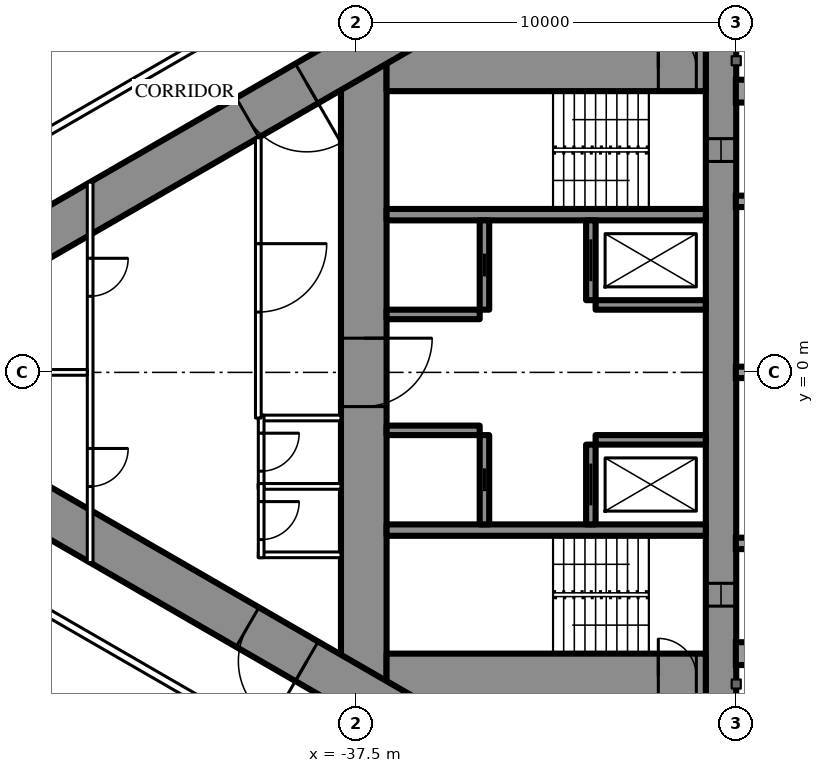
"""IFC4 building model, lengths in metres.
Left out: names, types, materials, properties, quantities, classifications, styles, units other than length and angle.
Written with IfcOpenShell. Run it as: python <this file> out.ifc"""

import sys

from ifc_helpers import new_model, si_unit, direction, frame, frame_2d, origin, place, context, subcontext, project, spatial, rectangle, extrude, element, fill, save


model = new_model("IFC4")
c1 = context("Model", 3, precision=1e-05, world=origin(), true_north=direction((0.0, 1.0)))
c2 = subcontext(c1, "Body", "Model", "MODEL_VIEW")
j1 = project(units=[si_unit("LENGTHUNIT", "METRE"), si_unit("PLANEANGLEUNIT", "RADIAN")], contexts=[c1])
p1 = place(None, origin())
s1 = spatial("IfcSite", under=j1, at=p1, CompositionType="ELEMENT")
p2 = place(p1, origin())
s2 = spatial("IfcBuilding", under=s1, at=p2, CompositionType="ELEMENT")
p3 = place(p2, frame((0.0, 0.0, 49.5)))
s3 = spatial("IfcBuildingStorey", under=s2, at=p3, CompositionType="ELEMENT", Elevation=49.5)
p4 = place(p3, frame((-27.9, 8.6, 0.0), z_axis=(0.0, 0.0, 1.0), x_axis=(0.0, -1.0, 0.0)))
e1 = element("IfcWall", 1, at=p4, inside=s3, PredefinedType="SHEAR", context=c2, shape_type="SweptSolid", body=[
    extrude(rectangle(XDim=17.2, YDim=0.8, at=frame_2d((8.6, 0.0))), origin(), (0.0, 0.0, 1.0), 3.5),
])
p5 = place(p4, frame((2.45, 0.0, 0.6)))
e2 = element("IfcOpeningElement", 2, at=p5, cuts=e1, PredefinedType="OPENING", context=c2, shape_type="SweptSolid", body=[
    extrude(rectangle(XDim=0.6, YDim=2.1, at=frame_2d((0.3, 1.05))), frame((0.0, 0.41, 0.0), z_axis=(0.0, -1.0, 0.0), x_axis=(1.0, 0.0, 0.0)), (0.0, 0.0, 1.0), 0.82),
])
p6 = place(p4, frame((14.15, 0.0, 0.6)))
e3 = element("IfcOpeningElement", 3, at=p6, cuts=e1, PredefinedType="OPENING", context=c2, shape_type="SweptSolid", body=[
    extrude(rectangle(XDim=0.6, YDim=2.1, at=frame_2d((0.3, 1.05))), frame((0.0, 0.41, 0.0), z_axis=(0.0, -1.0, 0.0), x_axis=(1.0, 0.0, 0.0)), (0.0, 0.0, 1.0), 0.82),
])
p7 = place(p3, frame((-37.3, 8.6, 0.0), z_axis=(0.0, 0.0, 1.0), x_axis=(0.0, -1.0, 0.0)))
e4 = element("IfcWall", 4, at=p7, inside=s3, PredefinedType="SHEAR", context=c2, shape_type="SweptSolid", body=[
    extrude(rectangle(XDim=17.2, YDim=1.2, at=frame_2d((8.6, 0.0))), origin(), (0.0, 0.0, 1.0), 3.5),
])
p8 = place(p7, frame((7.7, 0.0, 0.0)))
e5 = element("IfcOpeningElement", 5, at=p8, cuts=e4, PredefinedType="OPENING", context=c2, shape_type="SweptSolid", body=[
    extrude(rectangle(XDim=1.8, YDim=2.2, at=frame_2d((0.9, 1.1))), frame((0.0, 0.61, 0.0), z_axis=(0.0, -1.0, 0.0), x_axis=(1.0, 0.0, 0.0)), (0.0, 0.0, 1.0), 1.22),
])
p9 = place(p3, frame((-28.3, 8.0, 0.0), z_axis=(0.0, 0.0, 1.0), x_axis=(-1.0, 0.0, 0.0)))
e6 = element("IfcWall", 6, at=p9, inside=s3, PredefinedType="SHEAR", context=c2, shape_type="SweptSolid", body=[
    extrude(rectangle(XDim=8.4, YDim=1.2, at=frame_2d((4.2, 0.0))), origin(), (0.0, 0.0, 1.0), 3.5),
])
p10 = place(p9, frame((0.25, 0.0, 0.0)))
e7 = element("IfcOpeningElement", 7, at=p10, cuts=e6, PredefinedType="OPENING", context=c2, shape_type="SweptSolid", body=[
    extrude(rectangle(XDim=1.0, YDim=2.2, at=frame_2d((0.5, 1.1))), frame((0.0, 0.61, 0.0), z_axis=(0.0, -1.0, 0.0), x_axis=(1.0, 0.0, 0.0)), (0.0, 0.0, 1.0), 1.22),
])
p11 = place(p3, frame((-28.3, -8.0, 0.0), z_axis=(0.0, 0.0, 1.0), x_axis=(-1.0, 0.0, 0.0)))
e8 = element("IfcWall", 8, at=p11, inside=s3, PredefinedType="SHEAR", context=c2, shape_type="SweptSolid", body=[
    extrude(rectangle(XDim=8.4, YDim=1.2, at=frame_2d((4.2, 0.0))), origin(), (0.0, 0.0, 1.0), 3.5),
])
p12 = place(p11, frame((0.25, 0.0, 0.0)))
e9 = element("IfcOpeningElement", 9, at=p12, cuts=e8, PredefinedType="OPENING", context=c2, shape_type="SweptSolid", body=[
    extrude(rectangle(XDim=1.0, YDim=2.2, at=frame_2d((0.5, 1.1))), frame((0.0, 0.61, 0.0), z_axis=(0.0, -1.0, 0.0), x_axis=(1.0, 0.0, 0.0)), (0.0, 0.0, 1.0), 1.22),
])
for number, where, z_axis, x_axis in (
    (10, (-28.3, 4.15, 0.0), (0.0, 0.0, 1.0), (-1.0, 0.0, 0.0)),
    (11, (-28.3, -4.15, 0.0), (0.0, 0.0, 1.0), (-1.0, 0.0, 0.0)),
):
    element("IfcWall", number, at=place(p3, frame(where, z_axis=z_axis, x_axis=x_axis)), inside=s3, PredefinedType="SHEAR", context=c2, shape_type="SweptSolid", body=[
        extrude(rectangle(XDim=8.4, YDim=0.3, at=frame_2d((4.2, 0.0))), origin(), (0.0, 0.0, 1.0), 3.5),
    ])
p13 = place(p3, frame((-31.325, 4.0, 0.0), z_axis=(0.0, 0.0, 1.0), x_axis=(0.0, -1.0, 0.0)))
e12 = element("IfcWall", 12, at=p13, inside=s3, PredefinedType="SHEAR", context=c2, shape_type="SweptSolid", body=[
    extrude(rectangle(XDim=2.1, YDim=0.25, at=frame_2d((1.05, 0.0))), origin(), (0.0, 0.0, 1.0), 3.5),
])
p14 = place(p13, frame((0.5, 0.0, 0.0)))
e13 = element("IfcOpeningElement", 13, at=p14, cuts=e12, PredefinedType="OPENING", context=c2, shape_type="SweptSolid", body=[
    extrude(rectangle(XDim=1.1, YDim=2.2, at=frame_2d((0.55, 1.1))), frame((0.0, 0.135, 0.0), z_axis=(0.0, -1.0, 0.0), x_axis=(1.0, 0.0, 0.0)), (0.0, 0.0, 1.0), 0.27),
])
p15 = place(p3, frame((-34.125, 4.0, 0.0), z_axis=(0.0, 0.0, 1.0), x_axis=(0.0, -1.0, 0.0)))
e14 = element("IfcWall", 14, at=p15, inside=s3, PredefinedType="SHEAR", context=c2, shape_type="SweptSolid", body=[
    extrude(rectangle(XDim=2.35, YDim=0.25, at=frame_2d((1.175, 0.0))), origin(), (0.0, 0.0, 1.0), 3.5),
])
p16 = place(p15, frame((0.875, 0.0, 0.0)))
e15 = element("IfcOpeningElement", 15, at=p16, cuts=e14, PredefinedType="OPENING", context=c2, shape_type="SweptSolid", body=[
    extrude(rectangle(XDim=0.6, YDim=2.0, at=frame_2d((0.3, 1.0))), frame((0.0, 0.135, 0.0), z_axis=(0.0, -1.0, 0.0), x_axis=(1.0, 0.0, 0.0)), (0.0, 0.0, 1.0), 0.27),
])
p17 = place(p3, frame((-28.3, 1.775, 0.0), z_axis=(0.0, 0.0, 1.0), x_axis=(-1.0, 0.0, 0.0)))
e16 = element("IfcWall", 16, at=p17, inside=s3, PredefinedType="SHEAR", context=c2, shape_type="SweptSolid", body=[
    extrude(rectangle(XDim=2.9, YDim=0.25, at=frame_2d((1.45, 0.0))), origin(), (0.0, 0.0, 1.0), 3.5),
])
p18 = place(p3, frame((-34.25, 1.525, 0.0), z_axis=(0.0, 0.0, 1.0), x_axis=(-1.0, 0.0, 0.0)))
e17 = element("IfcWall", 17, at=p18, inside=s3, PredefinedType="SHEAR", context=c2, shape_type="SweptSolid", body=[
    extrude(rectangle(XDim=2.45, YDim=0.25, at=frame_2d((1.225, 0.0))), origin(), (0.0, 0.0, 1.0), 3.5),
])
p19 = place(p3, frame((-31.325, -1.9, 0.0), z_axis=(0.0, 0.0, 1.0), x_axis=(0.0, -1.0, 0.0)))
e18 = element("IfcWall", 18, at=p19, inside=s3, PredefinedType="SHEAR", context=c2, shape_type="SweptSolid", body=[
    extrude(rectangle(XDim=2.1, YDim=0.25, at=frame_2d((1.05, 0.0))), origin(), (0.0, 0.0, 1.0), 3.5),
])
p20 = place(p19, frame((0.5, 0.0, 0.0)))
e19 = element("IfcOpeningElement", 19, at=p20, cuts=e18, PredefinedType="OPENING", context=c2, shape_type="SweptSolid", body=[
    extrude(rectangle(XDim=1.1, YDim=2.2, at=frame_2d((0.55, 1.1))), frame((0.0, 0.135, 0.0), z_axis=(0.0, -1.0, 0.0), x_axis=(1.0, 0.0, 0.0)), (0.0, 0.0, 1.0), 0.27),
])
p21 = place(p3, frame((-34.125, -1.65, 0.0), z_axis=(0.0, 0.0, 1.0), x_axis=(0.0, -1.0, 0.0)))
e20 = element("IfcWall", 20, at=p21, inside=s3, PredefinedType="SHEAR", context=c2, shape_type="SweptSolid", body=[
    extrude(rectangle(XDim=2.35, YDim=0.25, at=frame_2d((1.175, 0.0))), origin(), (0.0, 0.0, 1.0), 3.5),
])
p22 = place(p21, frame((0.875, 0.0, 0.0)))
e21 = element("IfcOpeningElement", 21, at=p22, cuts=e20, PredefinedType="OPENING", context=c2, shape_type="SweptSolid", body=[
    extrude(rectangle(XDim=0.6, YDim=2.0, at=frame_2d((0.3, 1.0))), frame((0.0, 0.135, 0.0), z_axis=(0.0, -1.0, 0.0), x_axis=(1.0, 0.0, 0.0)), (0.0, 0.0, 1.0), 0.27),
])
p23 = place(p3, frame((-28.3, -1.775, 0.0), z_axis=(0.0, 0.0, 1.0), x_axis=(-1.0, 0.0, 0.0)))
e22 = element("IfcWall", 22, at=p23, inside=s3, PredefinedType="SHEAR", context=c2, shape_type="SweptSolid", body=[
    extrude(rectangle(XDim=2.9, YDim=0.25, at=frame_2d((1.45, 0.0))), origin(), (0.0, 0.0, 1.0), 3.5),
])
p24 = place(p3, frame((-34.25, -1.525, 0.0), z_axis=(0.0, 0.0, 1.0), x_axis=(-1.0, 0.0, 0.0)))
e23 = element("IfcWall", 23, at=p24, inside=s3, PredefinedType="SHEAR", context=c2, shape_type="SweptSolid", body=[
    extrude(rectangle(XDim=2.45, YDim=0.25, at=frame_2d((1.225, 0.0))), origin(), (0.0, 0.0, 1.0), 3.5),
])
p25 = place(p3, frame((-27.2, 14.3, 0.0), z_axis=(0.0, 0.0, 1.0), x_axis=(-0.866026593062, -0.499997940104, 0.0)))
e24 = element("IfcWall", 24, at=p25, inside=s3, PredefinedType="SHEAR", context=c2, shape_type="SweptSolid", body=[
    extrude(rectangle(XDim=28.946, YDim=1.2, at=frame_2d((14.473, 0.0))), origin(), (0.0, 0.0, 1.0), 3.5),
])
p26 = place(p25, frame((4.6, 0.0, 0.0)))
e25 = element("IfcOpeningElement", 25, at=p26, cuts=e24, PredefinedType="OPENING", context=c2, shape_type="SweptSolid", body=[
    extrude(rectangle(XDim=1.0, YDim=2.2, at=frame_2d((0.5, 1.1))), frame((0.0, 0.61, 0.0), z_axis=(0.0, -1.0, 0.0), x_axis=(1.0, 0.0, 0.0)), (0.0, 0.0, 1.0), 1.22),
])
p27 = place(p25, frame((13.395, 0.0, 0.0)))
e26 = element("IfcOpeningElement", 26, at=p27, cuts=e24, PredefinedType="OPENING", context=c2, shape_type="SweptSolid", body=[
    extrude(rectangle(XDim=1.8, YDim=2.2, at=frame_2d((0.9, 1.1))), frame((0.0, 0.61, 0.0), z_axis=(0.0, -1.0, 0.0), x_axis=(1.0, 0.0, 0.0)), (0.0, 0.0, 1.0), 1.22),
])
p28 = place(p3, frame((-27.2, -14.3, 0.0), z_axis=(0.0, 0.0, 1.0), x_axis=(-0.866024021859, 0.500002393557, 0.0)))
e27 = element("IfcWall", 27, at=p28, inside=s3, PredefinedType="SHEAR", context=c2, shape_type="SweptSolid", body=[
    extrude(rectangle(XDim=27.907, YDim=1.2, at=frame_2d((13.954, 0.0))), origin(), (0.0, 0.0, 1.0), 3.5),
])
p29 = place(p28, frame((4.6, 0.0, 0.0)))
e28 = element("IfcOpeningElement", 28, at=p29, cuts=e27, PredefinedType="OPENING", context=c2, shape_type="SweptSolid", body=[
    extrude(rectangle(XDim=1.0, YDim=2.2, at=frame_2d((0.5, 1.1))), frame((0.0, 0.61, 0.0), z_axis=(0.0, -1.0, 0.0), x_axis=(1.0, 0.0, 0.0)), (0.0, 0.0, 1.0), 1.22),
])
p30 = place(p28, frame((13.395, 0.0, 0.0)))
e29 = element("IfcOpeningElement", 29, at=p30, cuts=e27, PredefinedType="OPENING", context=c2, shape_type="SweptSolid", body=[
    extrude(rectangle(XDim=1.8, YDim=2.2, at=frame_2d((0.9, 1.1))), frame((0.0, 0.61, 0.0), z_axis=(0.0, -1.0, 0.0), x_axis=(1.0, 0.0, 0.0)), (0.0, 0.0, 1.0), 1.22),
])
p31 = place(p3, frame((-37.7, 10.894, 0.0), z_axis=(0.0, 0.0, 1.0), x_axis=(-0.866027905338, -0.499995667157, 0.0)))
e30 = element("IfcWall", 30, at=p31, inside=s3, PredefinedType="PARTITIONING", context=c2, shape_type="SweptSolid", body=[
    extrude(rectangle(XDim=21.787, YDim=0.2, at=frame_2d((10.894, 0.0))), origin(), (0.0, 0.0, 1.0), 3.25),
])
p32 = place(p31, frame((20.237, 0.0, 0.0)))
e31 = element("IfcOpeningElement", 31, at=p32, cuts=e30, PredefinedType="OPENING", context=c2, shape_type="SweptSolid", body=[
    extrude(rectangle(XDim=0.95, YDim=2.2, at=frame_2d((0.475, 1.1))), frame((0.0, 0.11, 0.0), z_axis=(0.0, -1.0, 0.0), x_axis=(1.0, 0.0, 0.0)), (0.0, 0.0, 1.0), 0.22),
])
p33 = place(p31, frame((2.95, 0.0, 0.0)))
e32 = element("IfcOpeningElement", 32, at=p33, cuts=e30, PredefinedType="OPENING", context=c2, shape_type="SweptSolid", body=[
    extrude(rectangle(XDim=0.95, YDim=2.2, at=frame_2d((0.475, 1.1))), frame((0.0, 0.11, 0.0), z_axis=(0.0, -1.0, 0.0), x_axis=(1.0, 0.0, 0.0)), (0.0, 0.0, 1.0), 0.22),
])
p34 = place(p3, frame((-36.92, -11.344, 0.0), z_axis=(0.0, 0.0, 1.0), x_axis=(-0.866025017052, 0.500000669839, 0.0)))
e33 = element("IfcWall", 33, at=p34, inside=s3, PredefinedType="PARTITIONING", context=c2, shape_type="SweptSolid", body=[
    extrude(rectangle(XDim=12.28, YDim=0.2, at=frame_2d((6.14, 0.0))), origin(), (0.0, 0.0, 1.0), 3.25),
])
p35 = place(p34, frame((3.35, 0.0, 0.0)))
e34 = element("IfcOpeningElement", 34, at=p35, cuts=e33, PredefinedType="OPENING", context=c2, shape_type="SweptSolid", body=[
    extrude(rectangle(XDim=1.0, YDim=2.2, at=frame_2d((0.5, 1.1))), frame((0.0, 0.11, 0.0), z_axis=(0.0, -1.0, 0.0), x_axis=(1.0, 0.0, 0.0)), (0.0, 0.0, 1.0), 0.22),
])
for number, where, z_axis, x_axis in (
    (35, (-37.9, -1.2, 0.0), (0.0, 0.0, 1.0), (-1.0, 0.0, 0.0)),
    (36, (-37.9, -3.0, 0.0), (0.0, 0.0, 1.0), (-1.0, 0.0, 0.0)),
    (37, (-37.9, -4.8, 0.0), (0.0, 0.0, 1.0), (-1.0, 0.0, 0.0)),
):
    element("IfcWall", number, at=place(p3, frame(where, z_axis=z_axis, x_axis=x_axis)), inside=s3, PredefinedType="PARTITIONING", context=c2, shape_type="SweptSolid", body=[
        extrude(rectangle(XDim=2.175, YDim=0.15, at=frame_2d((1.087, 0.0))), origin(), (0.0, 0.0, 1.0), 3.25),
    ])
p36 = place(p3, frame((-40.0, -1.125, 0.0), z_axis=(0.0, 0.0, 1.0), x_axis=(0.0, -1.0, 0.0)))
e38 = element("IfcWall", 38, at=p36, inside=s3, PredefinedType="PARTITIONING", context=c2, shape_type="SweptSolid", body=[
    extrude(rectangle(XDim=1.95, YDim=0.15, at=frame_2d((0.975, 0.0))), origin(), (0.0, 0.0, 1.0), 3.25),
])
p37 = place(p36, frame((0.475, 0.0, 0.0)))
e39 = element("IfcOpeningElement", 39, at=p37, cuts=e38, PredefinedType="OPENING", context=c2, shape_type="SweptSolid", body=[
    extrude(rectangle(XDim=1.0, YDim=2.2, at=frame_2d((0.5, 1.1))), frame((0.0, 0.085, 0.0), z_axis=(0.0, -1.0, 0.0), x_axis=(1.0, 0.0, 0.0)), (0.0, 0.0, 1.0), 0.17),
])
p38 = place(p3, frame((-40.0, -2.925, 0.0), z_axis=(0.0, 0.0, 1.0), x_axis=(0.0, -1.0, 0.0)))
e40 = element("IfcWall", 40, at=p38, inside=s3, PredefinedType="PARTITIONING", context=c2, shape_type="SweptSolid", body=[
    extrude(rectangle(XDim=1.95, YDim=0.15, at=frame_2d((0.975, 0.0))), origin(), (0.0, 0.0, 1.0), 3.25),
])
p39 = place(p38, frame((0.475, 0.0, 0.0)))
e41 = element("IfcOpeningElement", 41, at=p39, cuts=e40, PredefinedType="OPENING", context=c2, shape_type="SweptSolid", body=[
    extrude(rectangle(XDim=1.0, YDim=2.2, at=frame_2d((0.5, 1.1))), frame((0.0, 0.085, 0.0), z_axis=(0.0, -1.0, 0.0), x_axis=(1.0, 0.0, 0.0)), (0.0, 0.0, 1.0), 0.17),
])
p40 = place(p3, frame((-40.075, 6.174, 0.0), z_axis=(0.0, 0.0, 1.0), x_axis=(0.0, -1.0, 0.0)))
e42 = element("IfcWall", 42, at=p40, inside=s3, PredefinedType="PARTITIONING", context=c2, shape_type="SweptSolid", body=[
    extrude(rectangle(XDim=7.374, YDim=0.15, at=frame_2d((3.687, 0.0))), origin(), (0.0, 0.0, 1.0), 3.25),
])
p41 = place(p40, frame((2.787, 0.0, 0.0)))
e43 = element("IfcOpeningElement", 43, at=p41, cuts=e42, PredefinedType="OPENING", context=c2, shape_type="SweptSolid", body=[
    extrude(rectangle(XDim=1.8, YDim=2.2, at=frame_2d((0.9, 1.1))), frame((0.0, 0.085, 0.0), z_axis=(0.0, -1.0, 0.0), x_axis=(1.0, 0.0, 0.0)), (0.0, 0.0, 1.0), 0.17),
])
p42 = place(p3, frame((-44.5, 5.005, 0.0), z_axis=(0.0, 0.0, 1.0), x_axis=(0.0, -1.0, 0.0)))
e44 = element("IfcWall", 44, at=p42, inside=s3, PredefinedType="PARTITIONING", context=c2, shape_type="SweptSolid", body=[
    extrude(rectangle(XDim=10.009, YDim=0.15, at=frame_2d((5.005, 0.0))), origin(), (0.0, 0.0, 1.0), 2.45),
])
p43 = place(p42, frame((2.002, 0.0, 0.0)))
e45 = element("IfcOpeningElement", 45, at=p43, cuts=e44, PredefinedType="OPENING", context=c2, shape_type="SweptSolid", body=[
    extrude(rectangle(XDim=1.0, YDim=2.2, at=frame_2d((0.5, 1.1))), frame((0.0, 0.085, 0.0), z_axis=(0.0, -1.0, 0.0), x_axis=(1.0, 0.0, 0.0)), (0.0, 0.0, 1.0), 0.17),
])
p44 = place(p42, frame((7.007, 0.0, 0.0)))
e46 = element("IfcOpeningElement", 46, at=p44, cuts=e44, PredefinedType="OPENING", context=c2, shape_type="SweptSolid", body=[
    extrude(rectangle(XDim=1.0, YDim=2.2, at=frame_2d((0.5, 1.1))), frame((0.0, 0.085, 0.0), z_axis=(0.0, -1.0, 0.0), x_axis=(1.0, 0.0, 0.0)), (0.0, 0.0, 1.0), 0.17),
])
p45 = place(p3, frame((-44.575, 0.0, 0.0), z_axis=(0.0, 0.0, 1.0), x_axis=(-1.0, 0.0, 0.0)))
e47 = element("IfcWall", 47, at=p45, inside=s3, PredefinedType="PARTITIONING", context=c2, shape_type="SweptSolid", body=[
    extrude(rectangle(XDim=8.593, YDim=0.15, at=frame_2d((4.297, 0.0))), origin(), (0.0, 0.0, 1.0), 2.25),
])
p46 = place(p37, origin())
e48 = element("IfcDoor", 48, at=p46, inside=s3, OperationType="SINGLE_SWING_LEFT", PredefinedType="DOOR", context=c2, shape_type="SweptSolid", body=[
    extrude(rectangle(XDim=1.0, YDim=2.2, at=frame_2d((0.5, 1.1))), frame((0.0, 0.025, 0.0), z_axis=(0.0, -1.0, 0.0), x_axis=(1.0, 0.0, 0.0)), (0.0, 0.0, 1.0), 0.05),
])
fill(e39, e48)
p47 = place(p39, origin())
e49 = element("IfcDoor", 49, at=p47, inside=s3, OperationType="SINGLE_SWING_LEFT", PredefinedType="DOOR", context=c2, shape_type="SweptSolid", body=[
    extrude(rectangle(XDim=1.0, YDim=2.2, at=frame_2d((0.5, 1.1))), frame((0.0, 0.025, 0.0), z_axis=(0.0, -1.0, 0.0), x_axis=(1.0, 0.0, 0.0)), (0.0, 0.0, 1.0), 0.05),
])
fill(e41, e49)
p48 = place(p41, origin())
e50 = element("IfcDoor", 50, at=p48, inside=s3, OperationType="DOUBLE_DOOR_SINGLE_SWING", PredefinedType="DOOR", context=c2, shape_type="SweptSolid", body=[
    extrude(rectangle(XDim=1.8, YDim=2.2, at=frame_2d((0.9, 1.1))), frame((0.0, 0.025, 0.0), z_axis=(0.0, -1.0, 0.0), x_axis=(1.0, 0.0, 0.0)), (0.0, 0.0, 1.0), 0.05),
])
fill(e43, e50)
p49 = place(p43, origin())
e51 = element("IfcDoor", 51, at=p49, inside=s3, OperationType="SINGLE_SWING_LEFT", PredefinedType="DOOR", context=c2, shape_type="SweptSolid", body=[
    extrude(rectangle(XDim=1.0, YDim=2.2, at=frame_2d((0.5, 1.1))), frame((0.0, 0.025, 0.0), z_axis=(0.0, -1.0, 0.0), x_axis=(1.0, 0.0, 0.0)), (0.0, 0.0, 1.0), 0.05),
])
fill(e45, e51)
p50 = place(p44, origin())
e52 = element("IfcDoor", 52, at=p50, inside=s3, OperationType="SINGLE_SWING_LEFT", PredefinedType="DOOR", context=c2, shape_type="SweptSolid", body=[
    extrude(rectangle(XDim=1.0, YDim=2.2, at=frame_2d((0.5, 1.1))), frame((0.0, 0.025, 0.0), z_axis=(0.0, -1.0, 0.0), x_axis=(1.0, 0.0, 0.0)), (0.0, 0.0, 1.0), 0.05),
])
fill(e46, e52)
p51 = place(p27, origin())
e53 = element("IfcDoor", 53, at=p51, inside=s3, OperationType="DOUBLE_DOOR_SINGLE_SWING", PredefinedType="DOOR", context=c2, shape_type="SweptSolid", body=[
    extrude(rectangle(XDim=1.8, YDim=2.2, at=frame_2d((0.9, 1.1))), frame((0.0, 0.025, 0.0), z_axis=(0.0, -1.0, 0.0), x_axis=(1.0, 0.0, 0.0)), (0.0, 0.0, 1.0), 0.05),
])
fill(e26, e53)
p52 = place(p30, origin())
e54 = element("IfcDoor", 54, at=p52, inside=s3, OperationType="DOUBLE_DOOR_SINGLE_SWING", PredefinedType="DOOR", context=c2, shape_type="SweptSolid", body=[
    extrude(rectangle(XDim=1.8, YDim=2.2, at=frame_2d((0.9, 1.1))), frame((0.0, 0.025, 0.0), z_axis=(0.0, -1.0, 0.0), x_axis=(1.0, 0.0, 0.0)), (0.0, 0.0, 1.0), 0.05),
])
fill(e29, e54)
p53 = place(p8, origin())
e55 = element("IfcDoor", 55, at=p53, inside=s3, OperationType="DOUBLE_DOOR_SINGLE_SWING", PredefinedType="DOOR", context=c2, shape_type="SweptSolid", body=[
    extrude(rectangle(XDim=1.8, YDim=2.2, at=frame_2d((0.9, 1.1))), frame((0.0, 0.025, 0.0), z_axis=(0.0, -1.0, 0.0), x_axis=(1.0, 0.0, 0.0)), (0.0, 0.0, 1.0), 0.05),
])
fill(e5, e55)
p54 = place(p10, origin())
e56 = element("IfcDoor", 56, at=p54, inside=s3, OperationType="SINGLE_SWING_RIGHT", PredefinedType="DOOR", context=c2, shape_type="SweptSolid", body=[
    extrude(rectangle(XDim=1.0, YDim=2.2, at=frame_2d((0.5, 1.1))), frame((0.0, 0.025, 0.0), z_axis=(0.0, -1.0, 0.0), x_axis=(1.0, 0.0, 0.0)), (0.0, 0.0, 1.0), 0.05),
])
fill(e7, e56)
p55 = place(p12, origin())
e57 = element("IfcDoor", 57, at=p55, inside=s3, OperationType="SINGLE_SWING_RIGHT", PredefinedType="DOOR", context=c2, shape_type="SweptSolid", body=[
    extrude(rectangle(XDim=1.0, YDim=2.2, at=frame_2d((0.5, 1.1))), frame((0.0, 0.025, 0.0), z_axis=(0.0, -1.0, 0.0), x_axis=(1.0, 0.0, 0.0)), (0.0, 0.0, 1.0), 0.05),
])
fill(e9, e57)
p56 = place(p14, origin())
e58 = element("IfcDoor", 58, at=p56, inside=s3, OperationType="SLIDING_TO_LEFT", PredefinedType="USERDEFINED", context=c2, shape_type="SweptSolid", body=[
    extrude(rectangle(XDim=1.1, YDim=2.2, at=frame_2d((0.55, 1.1))), frame((0.0, 0.025, 0.0), z_axis=(0.0, -1.0, 0.0), x_axis=(1.0, 0.0, 0.0)), (0.0, 0.0, 1.0), 0.05),
])
fill(e13, e58)
p57 = place(p20, origin())
e59 = element("IfcDoor", 59, at=p57, inside=s3, OperationType="SLIDING_TO_LEFT", PredefinedType="USERDEFINED", context=c2, shape_type="SweptSolid", body=[
    extrude(rectangle(XDim=1.1, YDim=2.2, at=frame_2d((0.55, 1.1))), frame((0.0, 0.025, 0.0), z_axis=(0.0, -1.0, 0.0), x_axis=(1.0, 0.0, 0.0)), (0.0, 0.0, 1.0), 0.05),
])
fill(e19, e59)
p58 = place(p16, origin())
e60 = element("IfcDoor", 60, at=p58, inside=s3, OperationType="SLIDING_TO_LEFT", PredefinedType="DOOR", context=c2, shape_type="SweptSolid", body=[
    extrude(rectangle(XDim=0.6, YDim=2.0, at=frame_2d((0.3, 1.0))), frame((0.0, 0.025, 0.0), z_axis=(0.0, -1.0, 0.0), x_axis=(1.0, 0.0, 0.0)), (0.0, 0.0, 1.0), 0.05),
])
fill(e15, e60)
p59 = place(p22, origin())
e61 = element("IfcDoor", 61, at=p59, inside=s3, OperationType="SLIDING_TO_LEFT", PredefinedType="DOOR", context=c2, shape_type="SweptSolid", body=[
    extrude(rectangle(XDim=0.6, YDim=2.0, at=frame_2d((0.3, 1.0))), frame((0.0, 0.025, 0.0), z_axis=(0.0, -1.0, 0.0), x_axis=(1.0, 0.0, 0.0)), (0.0, 0.0, 1.0), 0.05),
])
fill(e21, e61)
p60 = place(p5, origin())
e62 = element("IfcWindow", 62, at=p60, inside=s3, PartitioningType="SINGLE_PANEL", PredefinedType="WINDOW", context=c2, shape_type="SweptSolid", body=[
    extrude(rectangle(XDim=0.6, YDim=2.1, at=frame_2d((0.3, 1.05))), frame((0.0, 0.03, 0.0), z_axis=(0.0, -1.0, 0.0), x_axis=(1.0, 0.0, 0.0)), (0.0, 0.0, 1.0), 0.06),
])
fill(e2, e62)
p61 = place(p6, origin())
e63 = element("IfcWindow", 63, at=p61, inside=s3, PartitioningType="SINGLE_PANEL", PredefinedType="WINDOW", context=c2, shape_type="SweptSolid", body=[
    extrude(rectangle(XDim=0.6, YDim=2.1, at=frame_2d((0.3, 1.05))), frame((0.0, 0.03, 0.0), z_axis=(0.0, -1.0, 0.0), x_axis=(1.0, 0.0, 0.0)), (0.0, 0.0, 1.0), 0.06),
])
fill(e3, e63)
save(model, sys.argv[1])
